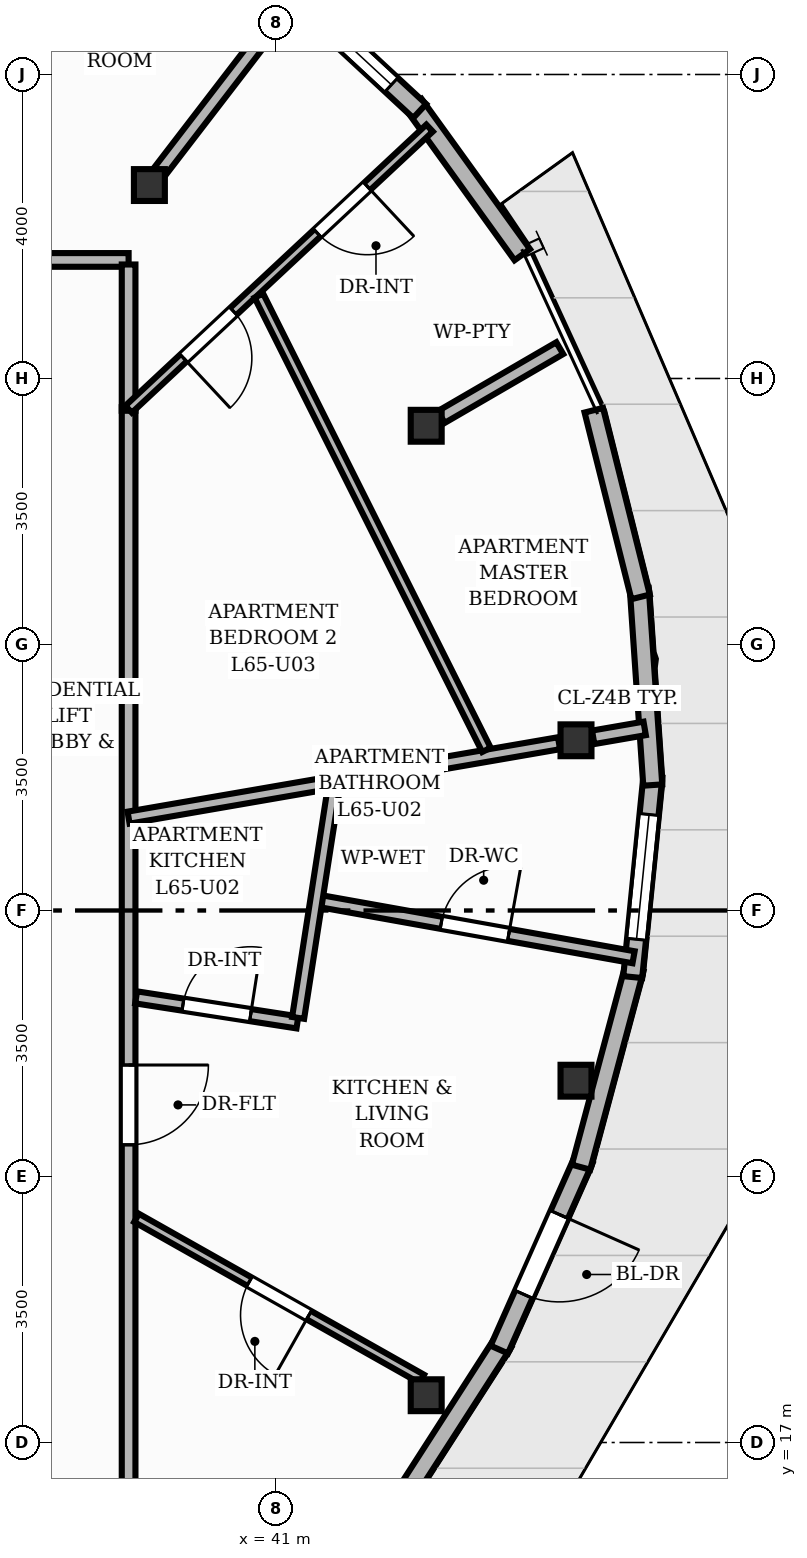
"""IFC4 building model, lengths in metres.
Left out: names, types, materials, properties, quantities, classifications, styles, units other than length and angle.
Written with IfcOpenShell. Run it as: python <this file> out.ifc"""

import sys

from ifc_helpers import new_model, si_unit, direction, frame, frame_2d, origin, origin_2d, place, context, subcontext, project, spatial, rectangle, i_section, extrude, element, fill, save


model = new_model("IFC4")
c1 = context("Model", 3, precision=1e-05, world=origin(), true_north=direction((0.0, 1.0)))
c2 = subcontext(c1, "Body", "Model", "MODEL_VIEW")
j1 = project(units=[si_unit("LENGTHUNIT", "METRE"), si_unit("PLANEANGLEUNIT", "RADIAN")], contexts=[c1])
p1 = place(None, origin())
s1 = spatial("IfcSite", under=j1, at=p1, CompositionType="ELEMENT")
p2 = place(p1, origin())
s2 = spatial("IfcBuilding", under=s1, at=p2, CompositionType="ELEMENT")
p3 = place(p2, frame((0.0, 0.0, 217.44)))
s3 = spatial("IfcBuildingStorey", under=s2, at=p3, CompositionType="ELEMENT", Elevation=217.44)
for number, where, z_axis, x_axis in (
    (1, (44.946, 26.24, 0.0), (0.0, 0.0, 1.0), (1.0, 0.0, 0.0)),
    (2, (42.975, 30.378, 0.0), (0.0, 0.0, 1.0), (1.0, 0.0, 0.0)),
    (3, (39.333, 33.545, 0.0), (0.0, 0.0, 1.0), (1.0, 0.0, 0.0)),
    (4, (42.975, 17.622, 0.0), (0.0, 0.0, 1.0), (1.0, 0.0, 0.0)),
    (5, (44.946, 21.76, 0.0), (0.0, 0.0, 1.0), (1.0, 0.0, 0.0)),
):
    element("IfcColumn", number, at=place(p3, frame(where, z_axis=z_axis, x_axis=x_axis)), inside=s3, PredefinedType="COLUMN", context=c2, shape_type="SweptSolid", body=[
        extrude(i_section(OverallWidth=0.407, OverallDepth=0.419, WebThickness=0.031, FlangeThickness=0.049, at=origin_2d()), origin(), (0.0, 0.0, 1.0), 3.2),
    ])
p4 = place(p3, frame((43.988, 18.319, 0.0), z_axis=(0.0, 0.0, 1.0), x_axis=(-0.540690479286, -0.841221615039, 0.0)))
e6 = element("IfcWall", 6, at=p4, inside=s3, PredefinedType="SOLIDWALL", context=c2, shape_type="SweptSolid", body=[
    extrude(rectangle(XDim=2.758, YDim=0.25, at=frame_2d((1.379, 0.0))), origin(), (0.0, 0.0, 1.0), 2.96),
])
p5 = place(p3, frame((45.049, 20.726, 0.0), z_axis=(0.0, 0.0, 1.0), x_axis=(-0.40624599189, -0.913763751783, 0.0)))
e7 = element("IfcWall", 7, at=p5, inside=s3, PredefinedType="SOLIDWALL", context=c2, shape_type="SweptSolid", body=[
    extrude(rectangle(XDim=2.739, YDim=0.25, at=frame_2d((1.369, 0.0))), origin(), (0.0, 0.0, 1.0), 2.96),
])
p6 = place(p5, frame((0.794, 0.0, 0.0)))
e8 = element("IfcOpeningElement", 8, at=p6, cuts=e7, PredefinedType="OPENING", context=c2, shape_type="SweptSolid", body=[
    extrude(rectangle(XDim=1.15, YDim=2.2, at=frame_2d((0.575, 1.1))), frame((0.0, 0.135, 0.0), z_axis=(0.0, -1.0, 0.0), x_axis=(1.0, 0.0, 0.0)), (0.0, 0.0, 1.0), 0.27),
])
p7 = place(p3, frame((45.712, 23.232, 0.0), z_axis=(0.0, 0.0, 1.0), x_axis=(-0.259023691836, -0.965870968126, 0.0)))
e9 = element("IfcWall", 9, at=p7, inside=s3, PredefinedType="SOLIDWALL", context=c2, shape_type="SweptSolid", body=[
    extrude(rectangle(XDim=2.701, YDim=0.25, at=frame_2d((1.351, 0.0))), origin(), (0.0, 0.0, 1.0), 2.577),
])
p8 = place(p3, frame((45.958, 25.761, 0.0), z_axis=(0.0, 0.0, 1.0), x_axis=(-0.100196668354, -0.99496765156, 0.0)))
e10 = element("IfcWall", 10, at=p8, inside=s3, PredefinedType="SOLIDWALL", context=c2, shape_type="SweptSolid", body=[
    extrude(rectangle(XDim=2.651, YDim=0.25, at=frame_2d((1.326, 0.0))), origin(), (0.0, 0.0, 1.0), 2.96),
])
p9 = place(p8, frame((0.501, 0.0, 0.85)))
e11 = element("IfcOpeningElement", 11, at=p9, cuts=e10, PredefinedType="OPENING", context=c2, shape_type="SweptSolid", body=[
    extrude(rectangle(XDim=1.65, YDim=1.55, at=frame_2d((0.825, 0.775))), frame((0.0, 0.135, 0.0), z_axis=(0.0, -1.0, 0.0), x_axis=(1.0, 0.0, 0.0)), (0.0, 0.0, 1.0), 0.27),
])
p10 = place(p3, frame((45.779, 28.237, 0.0), z_axis=(0.0, 0.0, 1.0), x_axis=(0.068469168344, -0.997653232835, 0.0)))
e12 = element("IfcWall", 12, at=p10, inside=s3, PredefinedType="SOLIDWALL", context=c2, shape_type="SweptSolid", body=[
    extrude(rectangle(XDim=2.592, YDim=0.25, at=frame_2d((1.296, 0.0))), origin(), (0.0, 0.0, 1.0), 2.96),
])
p11 = place(p3, frame((45.18, 30.583, 0.0), z_axis=(0.0, 0.0, 1.0), x_axis=(0.243170809566, -0.969983483042, 0.0)))
e13 = element("IfcWall", 13, at=p11, inside=s3, PredefinedType="SOLIDWALL", context=c2, shape_type="SweptSolid", body=[
    extrude(rectangle(XDim=2.532, YDim=0.25, at=frame_2d((1.266, 0.0))), origin(), (0.0, 0.0, 1.0), 2.96),
])
p12 = place(p3, frame((42.814, 34.605, 0.0), z_axis=(0.0, 0.0, 1.0), x_axis=(0.584824573101, -0.811159798497, 0.0)))
e14 = element("IfcWall", 14, at=p12, inside=s3, PredefinedType="SOLIDWALL", context=c2, shape_type="SweptSolid", body=[
    extrude(rectangle(XDim=2.437, YDim=0.25, at=frame_2d((1.218, 0.0))), origin(), (0.0, 0.0, 1.0), 2.96),
])
p13 = place(p3, frame((41.119, 36.161, 0.0), z_axis=(0.0, 0.0, 1.0), x_axis=(0.733441361842, -0.679752726173, 0.0)))
e15 = element("IfcWall", 15, at=p13, inside=s3, PredefinedType="SOLIDWALL", context=c2, shape_type="SweptSolid", body=[
    extrude(rectangle(XDim=2.415, YDim=0.25, at=frame_2d((1.207, 0.0))), origin(), (0.0, 0.0, 1.0), 2.96),
])
p14 = place(p13, frame((0.507, 0.0, 0.85)))
e16 = element("IfcOpeningElement", 16, at=p14, cuts=e15, PredefinedType="OPENING", context=c2, shape_type="SweptSolid", body=[
    extrude(rectangle(XDim=1.4, YDim=1.55, at=frame_2d((0.7, 0.775))), frame((0.0, 0.135, 0.0), z_axis=(0.0, -1.0, 0.0), x_axis=(1.0, 0.0, 0.0)), (0.0, 0.0, 1.0), 0.27),
])
p15 = place(p3, frame((45.173, 26.279, 0.0), z_axis=(0.0, 0.0, 1.0), x_axis=(0.985357392461, 0.170501639647, 0.0)))
e17 = element("IfcWall", 17, at=p15, inside=s3, PredefinedType="PARTITIONING", context=c2, shape_type="SweptSolid", body=[
    extrude(rectangle(XDim=0.687, YDim=0.18, at=frame_2d((0.344, 0.0))), origin(), (0.0, 0.0, 1.0), 2.404),
])
p16 = place(p3, frame((43.174, 30.493, 0.0), z_axis=(0.0, 0.0, 1.0), x_axis=(0.864637155841, 0.502396843879, 0.0)))
e18 = element("IfcWall", 18, at=p16, inside=s3, PredefinedType="PARTITIONING", context=c2, shape_type="SweptSolid", body=[
    extrude(rectangle(XDim=1.803, YDim=0.18, at=frame_2d((0.901, 0.0))), origin(), (0.0, 0.0, 1.0), 2.404),
])
p17 = place(p3, frame((39.473, 33.727, 0.0), z_axis=(0.0, 0.0, 1.0), x_axis=(0.609244614772, 0.792982344931, 0.0)))
e19 = element("IfcWall", 19, at=p17, inside=s3, PredefinedType="PARTITIONING", context=c2, shape_type="SweptSolid", body=[
    extrude(rectangle(XDim=2.861, YDim=0.18, at=frame_2d((1.43, 0.0))), origin(), (0.0, 0.0, 1.0), 2.404),
])
p18 = place(p3, frame((39.06, 30.623, 0.0), z_axis=(0.0, 0.0, 1.0), x_axis=(0.0, -1.0, 0.0)))
e20 = element("IfcWall", 20, at=p18, inside=s3, PredefinedType="PARTITIONING", context=c2, shape_type="SweptSolid", body=[
    extrude(rectangle(XDim=15.183, YDim=0.18, at=frame_2d((7.591, 0.0))), origin(), (0.0, 0.0, 1.0), 2.955),
])
p19 = place(p18, frame((8.656, 0.0, 0.0)))
e21 = element("IfcOpeningElement", 21, at=p19, cuts=e20, PredefinedType="OPENING", context=c2, shape_type="SweptSolid", body=[
    extrude(rectangle(XDim=1.05, YDim=2.15, at=frame_2d((0.525, 1.075))), frame((0.0, 0.1, 0.0), z_axis=(0.0, -1.0, 0.0), x_axis=(1.0, 0.0, 0.0)), (0.0, 0.0, 1.0), 0.2),
])
p20 = place(p3, frame((33.2, 32.56, 0.0), z_axis=(0.0, 0.0, 1.0), x_axis=(1.0, 0.0, 0.0)))
e22 = element("IfcWall", 22, at=p20, inside=s3, PredefinedType="PARTITIONING", context=c2, shape_type="SweptSolid", body=[
    extrude(rectangle(XDim=5.86, YDim=0.18, at=frame_2d((2.93, 0.0))), origin(), (0.0, 0.0, 1.0), 2.955),
])
p21 = place(p20, frame((3.227, 0.0, 0.0)))
e23 = element("IfcOpeningElement", 23, at=p21, cuts=e22, PredefinedType="OPENING", context=c2, shape_type="SweptSolid", body=[
    extrude(rectangle(XDim=1.05, YDim=2.15, at=frame_2d((0.525, 1.075))), frame((0.0, 0.1, 0.0), z_axis=(0.0, -1.0, 0.0), x_axis=(1.0, 0.0, 0.0)), (0.0, 0.0, 1.0), 0.2),
])
p22 = place(p3, frame((39.06, 32.5, 0.0), z_axis=(0.0, 0.0, 1.0), x_axis=(0.0, -1.0, 0.0)))
e24 = element("IfcWall", 24, at=p22, inside=s3, PredefinedType="PARTITIONING", context=c2, shape_type="SweptSolid", body=[
    extrude(rectangle(XDim=1.925, YDim=0.18, at=frame_2d((0.962, 0.0))), origin(), (0.0, 0.0, 1.0), 2.955),
])
p23 = place(p3, frame((41.53, 24.132, 0.0), z_axis=(0.0, 0.0, 1.0), x_axis=(0.98434454673, -0.176254966805, 0.0)))
e25 = element("IfcWall", 25, at=p23, inside=s3, PredefinedType="PLUMBINGWALL", context=c2, shape_type="SweptSolid", body=[
    extrude(rectangle(XDim=4.24, YDim=0.16, at=frame_2d((2.12, 0.0))), origin(), (0.0, 0.0, 1.0), 2.955),
])
p24 = place(p23, frame((1.67, 0.0, 0.0)))
e26 = element("IfcOpeningElement", 26, at=p24, cuts=e25, PredefinedType="OPENING", context=c2, shape_type="SweptSolid", body=[
    extrude(rectangle(XDim=0.9, YDim=2.1, at=frame_2d((0.45, 1.05))), frame((0.0, 0.09, 0.0), z_axis=(0.0, -1.0, 0.0), x_axis=(1.0, 0.0, 0.0)), (0.0, 0.0, 1.0), 0.18),
])
p25 = place(p3, frame((42.917, 17.837, 0.0), z_axis=(0.0, 0.0, 1.0), x_axis=(-0.870825482781, 0.491592288933, 0.0)))
e27 = element("IfcWall", 27, at=p25, inside=s3, PredefinedType="PARTITIONING", context=c2, shape_type="SweptSolid", body=[
    extrude(rectangle(XDim=4.309, YDim=0.125, at=frame_2d((2.154, 0.0))), origin(), (0.0, 0.0, 1.0), 2.404),
])
p26 = place(p25, frame((1.705, 0.0, 0.0)))
e28 = element("IfcOpeningElement", 28, at=p26, cuts=e27, PredefinedType="OPENING", context=c2, shape_type="SweptSolid", body=[
    extrude(rectangle(XDim=0.9, YDim=2.1, at=frame_2d((0.45, 1.05))), frame((0.0, 0.073, 0.0), z_axis=(0.0, -1.0, 0.0), x_axis=(1.0, 0.0, 0.0)), (0.0, 0.0, 1.0), 0.145),
])
p27 = place(p3, frame((39.159, 22.857, 0.0), z_axis=(0.0, 0.0, 1.0), x_axis=(0.98817241845, -0.15334689894, 0.0)))
e29 = element("IfcWall", 29, at=p27, inside=s3, PredefinedType="PLUMBINGWALL", context=c2, shape_type="SweptSolid", body=[
    extrude(rectangle(XDim=2.148, YDim=0.16, at=frame_2d((1.074, 0.0))), origin(), (0.0, 0.0, 1.0), 2.404),
])
p28 = place(p27, frame((0.624, 0.0, 0.0)))
e30 = element("IfcOpeningElement", 30, at=p28, cuts=e29, PredefinedType="OPENING", context=c2, shape_type="SweptSolid", body=[
    extrude(rectangle(XDim=0.9, YDim=2.1, at=frame_2d((0.45, 1.05))), frame((0.0, 0.09, 0.0), z_axis=(0.0, -1.0, 0.0), x_axis=(1.0, 0.0, 0.0)), (0.0, 0.0, 1.0), 0.18),
])
p29 = place(p3, frame((41.29, 22.587, 0.0), z_axis=(0.0, 0.0, 1.0), x_axis=(0.153371357182, 0.988168622653, 0.0)))
e31 = element("IfcWall", 31, at=p29, inside=s3, PredefinedType="PLUMBINGWALL", context=c2, shape_type="SweptSolid", body=[
    extrude(rectangle(XDim=3.141, YDim=0.16, at=frame_2d((1.57, 0.0))), origin(), (0.0, 0.0, 1.0), 2.955),
])
p30 = place(p3, frame((39.06, 25.222, 0.0), z_axis=(0.0, 0.0, 1.0), x_axis=(0.985376851804, 0.170389142636, 0.0)))
e32 = element("IfcWall", 32, at=p30, inside=s3, PredefinedType="PLUMBINGWALL", context=c2, shape_type="SweptSolid", body=[
    extrude(rectangle(XDim=5.747, YDim=0.16, at=frame_2d((2.874, 0.0))), origin(), (0.0, 0.0, 1.0), 2.404),
])
p31 = place(p3, frame((43.02, 34.294, 0.0), z_axis=(0.0, 0.0, 1.0), x_axis=(-0.730757039427, -0.682637641307, 0.0)))
e33 = element("IfcWall", 33, at=p31, inside=s3, PredefinedType="PARTITIONING", context=c2, shape_type="SweptSolid", body=[
    extrude(rectangle(XDim=5.419, YDim=0.125, at=frame_2d((2.709, 0.0))), origin(), (0.0, 0.0, 1.0), 2.955),
])
p32 = place(p31, frame((1.122, 0.0, 0.0)))
e34 = element("IfcOpeningElement", 34, at=p32, cuts=e33, PredefinedType="OPENING", context=c2, shape_type="SweptSolid", body=[
    extrude(rectangle(XDim=0.9, YDim=2.1, at=frame_2d((0.45, 1.05))), frame((0.0, 0.073, 0.0), z_axis=(0.0, -1.0, 0.0), x_axis=(1.0, 0.0, 0.0)), (0.0, 0.0, 1.0), 0.145),
])
p33 = place(p31, frame((3.531, 0.0, 0.0)))
e35 = element("IfcOpeningElement", 35, at=p33, cuts=e33, PredefinedType="OPENING", context=c2, shape_type="SweptSolid", body=[
    extrude(rectangle(XDim=0.9, YDim=2.1, at=frame_2d((0.45, 1.05))), frame((0.0, 0.073, 0.0), z_axis=(0.0, -1.0, 0.0), x_axis=(1.0, 0.0, 0.0)), (0.0, 0.0, 1.0), 0.145),
])
p34 = place(p3, frame((43.768, 26.114, 0.0), z_axis=(0.0, 0.0, 1.0), x_axis=(-0.447958394428, 0.894054403748, 0.0)))
e36 = element("IfcWall", 36, at=p34, inside=s3, PredefinedType="PARTITIONING", context=c2, shape_type="SweptSolid", body=[
    extrude(rectangle(XDim=6.686, YDim=0.125, at=frame_2d((3.343, 0.0))), origin(), (0.0, 0.0, 1.0), 2.488),
])
p35 = place(p6, origin())
e37 = element("IfcDoor", 37, at=p35, inside=s3, OperationType="SINGLE_SWING_LEFT", PredefinedType="DOOR", context=c2, shape_type="SweptSolid", body=[
    extrude(rectangle(XDim=1.15, YDim=2.2, at=frame_2d((0.575, 1.1))), frame((0.0, 0.025, 0.0), z_axis=(0.0, -1.0, 0.0), x_axis=(1.0, 0.0, 0.0)), (0.0, 0.0, 1.0), 0.05),
])
fill(e8, e37)
p36 = place(p9, origin())
e38 = element("IfcWindow", 38, at=p36, inside=s3, PartitioningType="SINGLE_PANEL", PredefinedType="WINDOW", context=c2, shape_type="SweptSolid", body=[
    extrude(rectangle(XDim=1.65, YDim=1.55, at=frame_2d((0.825, 0.775))), frame((0.0, 0.03, 0.0), z_axis=(0.0, -1.0, 0.0), x_axis=(1.0, 0.0, 0.0)), (0.0, 0.0, 1.0), 0.06),
])
fill(e11, e38)
p37 = place(p14, origin())
e39 = element("IfcWindow", 39, at=p37, inside=s3, PartitioningType="SINGLE_PANEL", PredefinedType="WINDOW", context=c2, shape_type="SweptSolid", body=[
    extrude(rectangle(XDim=1.4, YDim=1.55, at=frame_2d((0.7, 0.775))), frame((0.0, 0.03, 0.0), z_axis=(0.0, -1.0, 0.0), x_axis=(1.0, 0.0, 0.0)), (0.0, 0.0, 1.0), 0.06),
])
fill(e16, e39)
p38 = place(p19, origin())
e40 = element("IfcDoor", 40, at=p38, inside=s3, OperationType="SINGLE_SWING_LEFT", PredefinedType="DOOR", context=c2, shape_type="SweptSolid", body=[
    extrude(rectangle(XDim=1.05, YDim=2.15, at=frame_2d((0.525, 1.075))), frame((0.0, 0.025, 0.0), z_axis=(0.0, -1.0, 0.0), x_axis=(1.0, 0.0, 0.0)), (0.0, 0.0, 1.0), 0.05),
])
fill(e21, e40)
p39 = place(p24, origin())
e41 = element("IfcDoor", 41, at=p39, inside=s3, OperationType="SINGLE_SWING_RIGHT", PredefinedType="DOOR", context=c2, shape_type="SweptSolid", body=[
    extrude(rectangle(XDim=0.9, YDim=2.1, at=frame_2d((0.45, 1.05))), frame((0.0, 0.025, 0.0), z_axis=(0.0, -1.0, 0.0), x_axis=(1.0, 0.0, 0.0)), (0.0, 0.0, 1.0), 0.05),
])
fill(e26, e41)
p40 = place(p26, origin())
e42 = element("IfcDoor", 42, at=p40, inside=s3, OperationType="SINGLE_SWING_LEFT", PredefinedType="DOOR", context=c2, shape_type="SweptSolid", body=[
    extrude(rectangle(XDim=0.9, YDim=2.1, at=frame_2d((0.45, 1.05))), frame((0.0, 0.025, 0.0), z_axis=(0.0, -1.0, 0.0), x_axis=(1.0, 0.0, 0.0)), (0.0, 0.0, 1.0), 0.05),
])
fill(e28, e42)
p41 = place(p28, origin())
e43 = element("IfcDoor", 43, at=p41, inside=s3, OperationType="SINGLE_SWING_RIGHT", PredefinedType="DOOR", context=c2, shape_type="SweptSolid", body=[
    extrude(rectangle(XDim=0.9, YDim=2.1, at=frame_2d((0.45, 1.05))), frame((0.0, 0.025, 0.0), z_axis=(0.0, -1.0, 0.0), x_axis=(1.0, 0.0, 0.0)), (0.0, 0.0, 1.0), 0.05),
])
fill(e30, e43)
p42 = place(p32, origin())
e44 = element("IfcDoor", 44, at=p42, inside=s3, OperationType="SINGLE_SWING_LEFT", PredefinedType="DOOR", context=c2, shape_type="SweptSolid", body=[
    extrude(rectangle(XDim=0.9, YDim=2.1, at=frame_2d((0.45, 1.05))), frame((0.0, 0.025, 0.0), z_axis=(0.0, -1.0, 0.0), x_axis=(1.0, 0.0, 0.0)), (0.0, 0.0, 1.0), 0.05),
])
fill(e34, e44)
p43 = place(p33, origin())
e45 = element("IfcDoor", 45, at=p43, inside=s3, OperationType="SINGLE_SWING_RIGHT", PredefinedType="DOOR", context=c2, shape_type="SweptSolid", body=[
    extrude(rectangle(XDim=0.9, YDim=2.1, at=frame_2d((0.45, 1.05))), frame((0.0, 0.025, 0.0), z_axis=(0.0, -1.0, 0.0), x_axis=(1.0, 0.0, 0.0)), (0.0, 0.0, 1.0), 0.05),
])
fill(e35, e45)
save(model, sys.argv[1])
